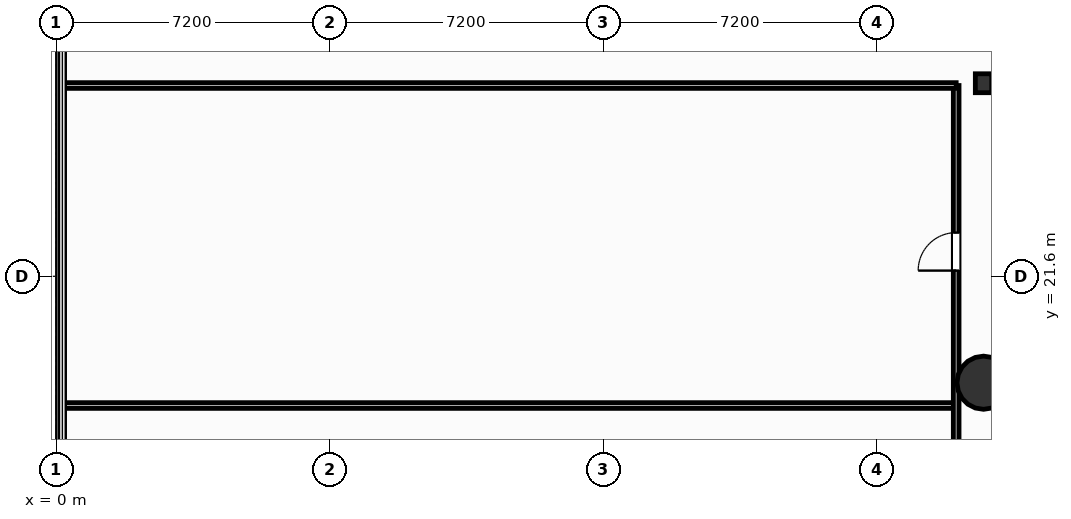
"""IFC4 building model, lengths in metres.
Left out: names, types, materials, properties, quantities, classifications, styles, units other than length and angle.
Written with IfcOpenShell. Run it as: python <this file> out.ifc"""

import sys

from ifc_helpers import new_model, si_unit, direction, frame, frame_2d, origin, origin_2d, place, context, subcontext, project, spatial, rectangle, circle, i_section, extrude, element, fill, save


model = new_model("IFC4")
c1 = context("Model", 3, precision=1e-05, world=origin(), true_north=direction((0.0, 1.0)))
c2 = subcontext(c1, "Body", "Model", "MODEL_VIEW")
j1 = project(units=[si_unit("LENGTHUNIT", "METRE"), si_unit("PLANEANGLEUNIT", "RADIAN")], contexts=[c1])
p1 = place(None, origin())
s1 = spatial("IfcSite", under=j1, at=p1, CompositionType="ELEMENT")
p2 = place(p1, origin())
s2 = spatial("IfcBuilding", under=s1, at=p2, CompositionType="ELEMENT")
p3 = place(p2, frame((0.0, 0.0, 21.6)))
s3 = spatial("IfcBuildingStorey", under=s2, at=p3, CompositionType="ELEMENT", Elevation=21.6)
p4 = place(p3, frame((24.4, 26.68, 0.0), z_axis=(0.0, 0.0, 1.0), x_axis=(1.0, 0.0, 0.0)))
e1 = element("IfcColumn", 1, at=p4, inside=s3, PredefinedType="COLUMN", context=c2, shape_type="SweptSolid", body=[
    extrude(i_section(OverallWidth=0.432, OverallDepth=0.498, WebThickness=0.056, FlangeThickness=0.089, FilletRadius=0.025, at=origin_2d()), origin(), (0.0, 0.0, 1.0), 5.4),
])
p5 = place(p3, frame((24.4, 18.8, 0.0), z_axis=(0.0, 0.0, 1.0), x_axis=(1.0, 0.0, 0.0)))
e2 = element("IfcColumn", 2, at=p5, inside=s3, PredefinedType="COLUMN", context=c2, shape_type="SweptSolid", body=[
    extrude(circle(Radius=0.7, at=origin_2d()), origin(), (0.0, 0.0, 1.0), 5.4),
])
p6 = place(p3, frame((0.2, 18.2, 0.0), z_axis=(0.0, 0.0, 1.0), x_axis=(1.0, 0.0, 0.0)))
e3 = element("IfcWall", 3, at=p6, inside=s3, PredefinedType="PARTITIONING", context=c2, shape_type="SweptSolid", body=[
    extrude(rectangle(XDim=23.48, YDim=0.15, at=frame_2d((11.74, 0.0))), origin(), (0.0, 0.0, 1.0), 1.935),
])
p7 = place(p3, frame((23.68, 0.25, 0.0), z_axis=(0.0, 0.0, 1.0), x_axis=(0.0, 1.0, 0.0)))
e4 = element("IfcWall", 4, at=p7, inside=s3, PredefinedType="PARTITIONING", context=c2, shape_type="SweptSolid", body=[
    extrude(rectangle(XDim=26.37, YDim=0.15, at=frame_2d((13.185, 0.0))), origin(), (0.0, 0.0, 1.0), 5.15),
])
p8 = place(p7, frame((21.5, 0.0, 0.0)))
e5 = element("IfcOpeningElement", 5, at=p8, cuts=e4, PredefinedType="OPENING", context=c2, shape_type="SweptSolid", body=[
    extrude(rectangle(XDim=1.0, YDim=2.05, at=frame_2d((0.5, 1.025))), frame((0.0, 0.085, 0.0), z_axis=(0.0, -1.0, 0.0), x_axis=(1.0, 0.0, 0.0)), (0.0, 0.0, 1.0), 0.17),
])
p9 = place(p7, frame((13.2, 0.0, 0.0)))
e6 = element("IfcOpeningElement", 6, at=p9, cuts=e4, PredefinedType="OPENING", context=c2, shape_type="SweptSolid", body=[
    extrude(rectangle(XDim=1.0, YDim=2.05, at=frame_2d((0.5, 1.025))), frame((0.0, 0.085, 0.0), z_axis=(0.0, -1.0, 0.0), x_axis=(1.0, 0.0, 0.0)), (0.0, 0.0, 1.0), 0.17),
])
p10 = place(p3, frame((0.2, 26.62, 0.0), z_axis=(0.0, 0.0, 1.0), x_axis=(1.0, 0.0, 0.0)))
e7 = element("IfcWall", 7, at=p10, inside=s3, PredefinedType="PARTITIONING", context=c2, shape_type="SweptSolid", body=[
    extrude(rectangle(XDim=23.48, YDim=0.15, at=frame_2d((11.74, 0.0))), origin(), (0.0, 0.0, 1.0), 5.15),
])
p11 = place(p8, origin())
e8 = element("IfcDoor", 8, at=p11, inside=s3, OperationType="SINGLE_SWING_LEFT", PredefinedType="DOOR", context=c2, shape_type="SweptSolid", body=[
    extrude(rectangle(XDim=1.0, YDim=2.05, at=frame_2d((0.5, 1.025))), frame((0.0, 0.025, 0.0), z_axis=(0.0, -1.0, 0.0), x_axis=(1.0, 0.0, 0.0)), (0.0, 0.0, 1.0), 0.05),
])
fill(e5, e8)
save(model, sys.argv[1])
